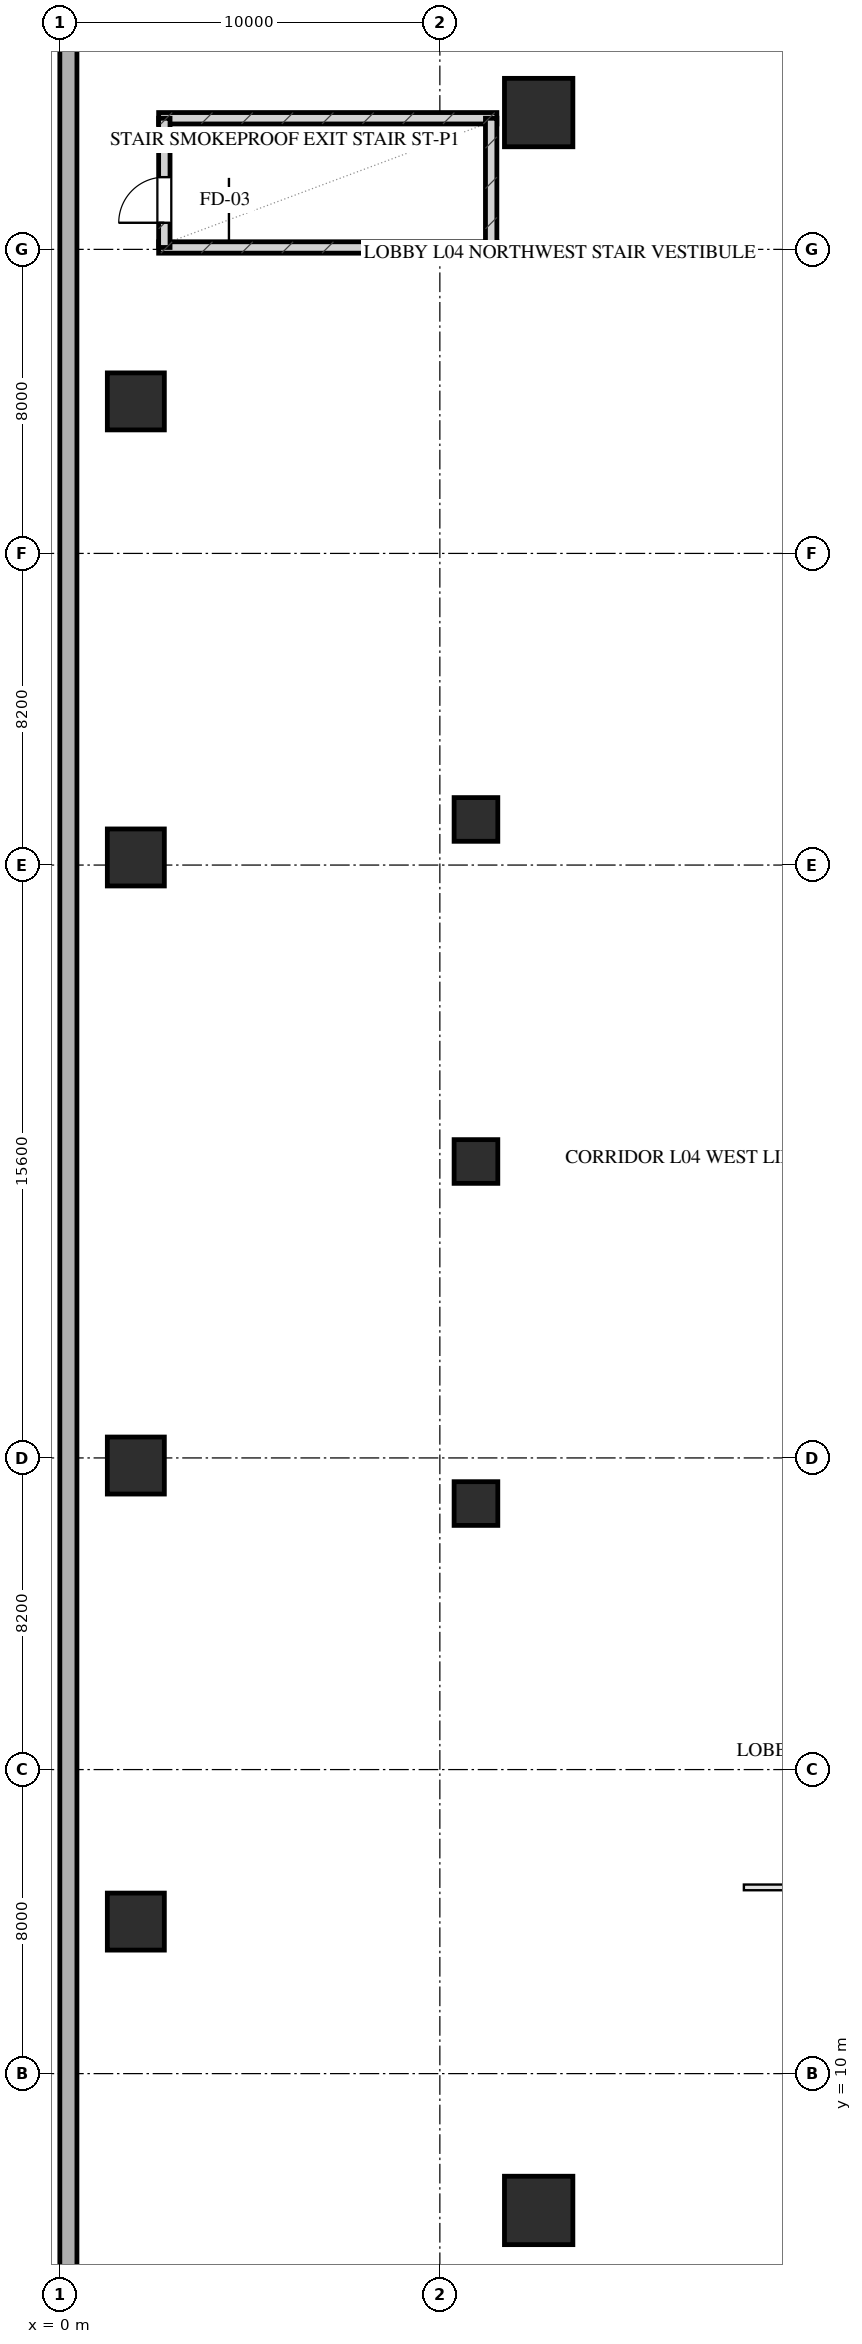
"""IFC4 building model, lengths in metres.
Left out: names, types, materials, properties, quantities, classifications, styles, units other than length and angle.
Written with IfcOpenShell. Run it as: python <this file> out.ifc"""

import sys

from ifc_helpers import new_model, si_unit, direction, frame, frame_2d, origin, origin_2d, place, context, subcontext, project, spatial, rectangle, hollow_rectangle, extrude, element, fill, save


model = new_model("IFC4")
c1 = context("Model", 3, precision=1e-05, world=origin(), true_north=direction((0.0, 1.0)))
c2 = subcontext(c1, "Body", "Model", "MODEL_VIEW")
j1 = project(units=[si_unit("LENGTHUNIT", "METRE"), si_unit("PLANEANGLEUNIT", "RADIAN")], contexts=[c1])
p1 = place(None, origin())
s1 = spatial("IfcSite", under=j1, at=p1, CompositionType="ELEMENT")
p2 = place(p1, origin())
s2 = spatial("IfcBuilding", under=s1, at=p2, CompositionType="ELEMENT")
p3 = place(p2, frame((0.0, 0.0, 22.0)))
s3 = spatial("IfcBuildingStorey", under=s2, at=p3, CompositionType="ELEMENT", Elevation=22.0)
for number, where, z_axis, x_axis in (
    (1, (2.6, 58.05, 0.0), (0.0, 0.0, 1.0), (1.0, 0.0, 0.0)),
    (2, (2.6, 61.45, 0.0), (0.0, 0.0, 1.0), (1.0, 0.0, 0.0)),
):
    element("IfcWall", number, at=place(p3, frame(where, z_axis=z_axis, x_axis=x_axis)), inside=s3, PredefinedType="SHEAR", context=c2, shape_type="SweptSolid", body=[
        extrude(rectangle(XDim=8.9, YDim=0.3, at=frame_2d((4.45, 0.0))), origin(), (0.0, 0.0, 1.0), 4.0),
    ])
p4 = place(p3, frame((11.35, 58.05, 0.0), z_axis=(0.0, 0.0, 1.0), x_axis=(0.0, 1.0, 0.0)))
e3 = element("IfcWall", 3, at=p4, inside=s3, PredefinedType="SHEAR", context=c2, shape_type="SweptSolid", body=[
    extrude(rectangle(XDim=3.4, YDim=0.3, at=frame_2d((1.7, 0.0))), origin(), (0.0, 0.0, 1.0), 4.0),
])
p5 = place(p3, frame((2.75, 58.05, 0.0), z_axis=(0.0, 0.0, 1.0), x_axis=(0.0, 1.0, 0.0)))
e4 = element("IfcWall", 4, at=p5, inside=s3, PredefinedType="SHEAR", context=c2, shape_type="SweptSolid", body=[
    extrude(rectangle(XDim=3.4, YDim=0.3, at=frame_2d((1.7, 0.0))), origin(), (0.0, 0.0, 1.0), 4.0),
])
p6 = place(p5, frame((0.65, 0.0, 0.0)))
e5 = element("IfcOpeningElement", 5, at=p6, cuts=e4, PredefinedType="OPENING", context=c2, shape_type="SweptSolid", body=[
    extrude(rectangle(XDim=1.2, YDim=2.05, at=frame_2d((0.6, 1.025))), frame((0.0, 0.16, 0.0), z_axis=(0.0, -1.0, 0.0), x_axis=(1.0, 0.0, 0.0)), (0.0, 0.0, 1.0), 0.32),
])
for number, where, z_axis, x_axis in (
    (6, (2.0, 14.0, 0.0), (0.0, 0.0, 1.0), (1.0, 0.0, 0.0)),
    (7, (2.0, 26.0, 0.0), (0.0, 0.0, 1.0), (1.0, 0.0, 0.0)),
    (8, (2.0, 42.0, 0.0), (0.0, 0.0, 1.0), (1.0, 0.0, 0.0)),
    (9, (2.0, 54.0, 0.0), (0.0, 0.0, 1.0), (1.0, 0.0, 0.0)),
):
    element("IfcColumn", number, at=place(p3, frame(where, z_axis=z_axis, x_axis=x_axis)), inside=s3, PredefinedType="COLUMN", context=c2, shape_type="SweptSolid", body=[
        extrude(rectangle(XDim=1.5, YDim=1.5, at=origin_2d()), origin(), (0.0, 0.0, 1.0), 4.001),
    ])
for number, where, z_axis, x_axis in (
    (10, (12.6, 6.4, 0.0), (0.0, 0.0, 1.0), (1.0, 0.0, 0.0)),
    (11, (12.6, 61.6, 0.0), (0.0, 0.0, 1.0), (1.0, 0.0, 0.0)),
):
    element("IfcColumn", number, at=place(p3, frame(where, z_axis=z_axis, x_axis=x_axis)), inside=s3, PredefinedType="COLUMN", context=c2, shape_type="SweptSolid", body=[
        extrude(hollow_rectangle(XDim=1.8, YDim=1.8, WallThickness=0.06, at=origin_2d()), origin(), (0.0, 0.0, 1.0), 4.001),
    ])
for number, where, z_axis, x_axis in (
    (12, (10.95, 25.0, 0.0), (0.0, 0.0, 1.0), (1.0, 0.0, 0.0)),
    (13, (10.95, 34.0, 0.0), (0.0, 0.0, 1.0), (1.0, 0.0, 0.0)),
    (14, (10.95, 43.0, 0.0), (0.0, 0.0, 1.0), (1.0, 0.0, 0.0)),
):
    element("IfcColumn", number, at=place(p3, frame(where, z_axis=z_axis, x_axis=x_axis)), inside=s3, PredefinedType="COLUMN", context=c2, shape_type="SweptSolid", body=[
        extrude(hollow_rectangle(XDim=1.15, YDim=1.15, WallThickness=0.04, at=origin_2d()), origin(), (0.0, 0.0, 1.0), 4.001),
    ])
p7 = place(p3, frame((0.225, 0.0, 0.0), z_axis=(0.0, 0.0, 1.0), x_axis=(0.0, 1.0, 0.0)))
e15 = element("IfcWall", 15, at=p7, inside=s3, PredefinedType="SOLIDWALL", context=c2, shape_type="SweptSolid", body=[
    extrude(rectangle(XDim=68.0, YDim=0.45, at=frame_2d((34.0, 0.0))), origin(), (0.0, 0.0, 1.0), 3.78),
])
p8 = place(p3, frame((18.0, 14.9, 0.0), z_axis=(0.0, 0.0, 1.0), x_axis=(1.0, 0.0, 0.0)))
e16 = element("IfcWall", 16, at=p8, inside=s3, PredefinedType="PARTITIONING", context=c2, shape_type="SweptSolid", body=[
    extrude(rectangle(XDim=88.0, YDim=0.15, at=frame_2d((44.0, 0.0))), origin(), (0.0, 0.0, 1.0), 2.615),
])
p9 = place(p8, frame((21.6, 0.0, 0.0)))
e17 = element("IfcOpeningElement", 17, at=p9, cuts=e16, PredefinedType="OPENING", context=c2, shape_type="SweptSolid", body=[
    extrude(rectangle(XDim=1.5, YDim=2.05, at=frame_2d((0.75, 1.025))), frame((0.0, 0.085, 0.0), z_axis=(0.0, -1.0, 0.0), x_axis=(1.0, 0.0, 0.0)), (0.0, 0.0, 1.0), 0.17),
])
p10 = place(p6, origin())
e18 = element("IfcDoor", 18, at=p10, inside=s3, OperationType="SINGLE_SWING_LEFT", PredefinedType="DOOR", context=c2, shape_type="SweptSolid", body=[
    extrude(rectangle(XDim=1.2, YDim=2.05, at=frame_2d((0.6, 1.025))), frame((0.0, 0.025, 0.0), z_axis=(0.0, -1.0, 0.0), x_axis=(1.0, 0.0, 0.0)), (0.0, 0.0, 1.0), 0.05),
])
fill(e5, e18)
save(model, sys.argv[1])
